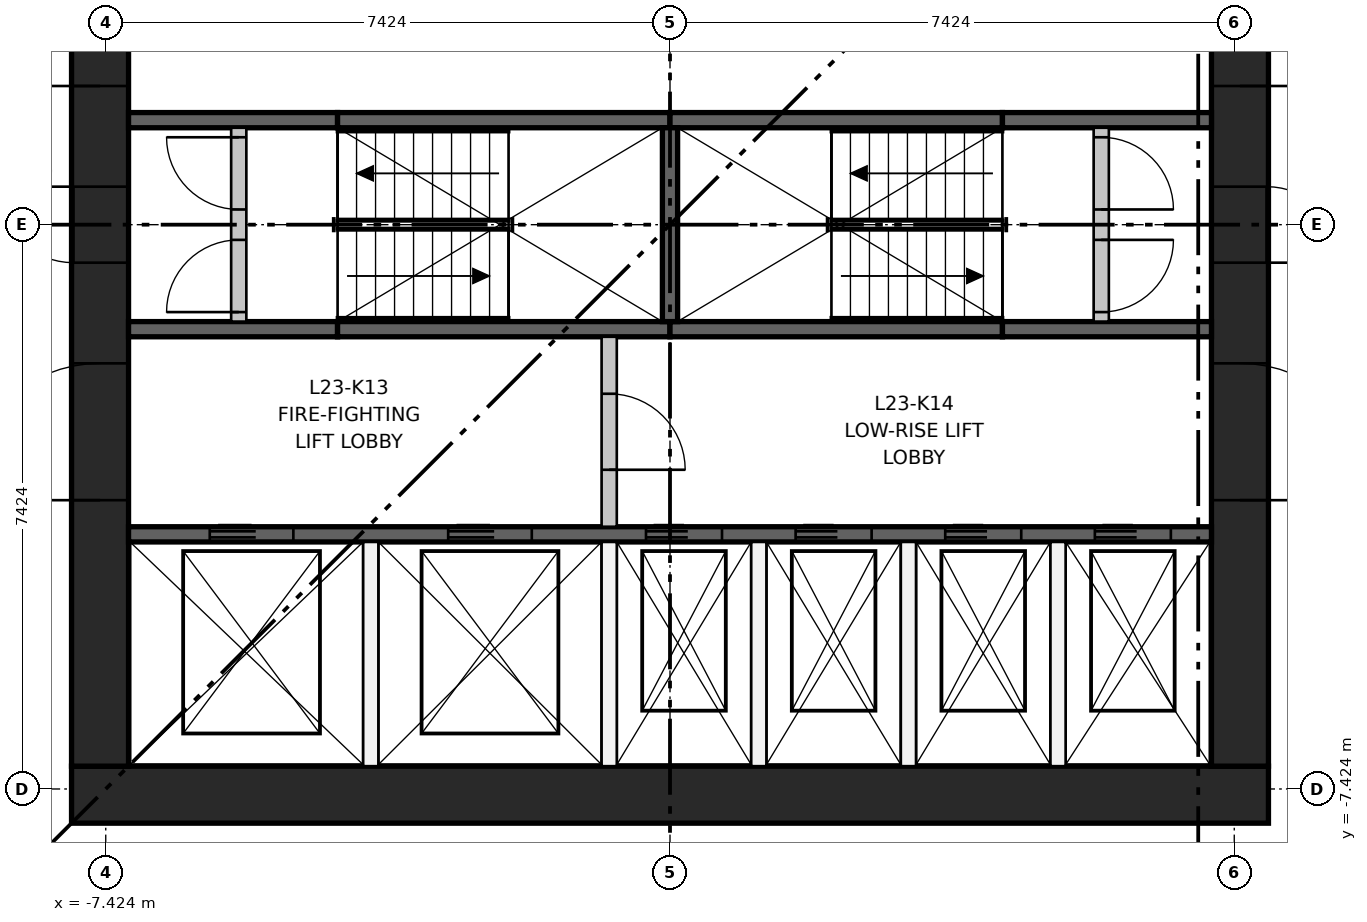
"""IFC4 building model, lengths in metres.
Left out: names, types, materials, properties, quantities, classifications, styles, units other than length and angle.
Written with IfcOpenShell. Run it as: python <this file> out.ifc"""

import sys

from ifc_helpers import new_model, si_unit, direction, frame, frame_2d, origin, place, context, subcontext, project, spatial, rectangle, extrude, element, fill, save


model = new_model("IFC4")
c1 = context("Model", 3, precision=1e-05, world=origin(), true_north=direction((0.0, 1.0)))
c2 = subcontext(c1, "Body", "Model", "MODEL_VIEW")
j1 = project(units=[si_unit("LENGTHUNIT", "METRE"), si_unit("PLANEANGLEUNIT", "RADIAN")], contexts=[c1])
p1 = place(None, origin())
s1 = spatial("IfcSite", under=j1, at=p1, CompositionType="ELEMENT")
p2 = place(p1, origin())
s2 = spatial("IfcBuilding", under=s1, at=p2, CompositionType="ELEMENT")
p3 = place(p2, frame((0.0, 0.0, 91.0)))
s3 = spatial("IfcBuildingStorey", under=s2, at=p3, CompositionType="ELEMENT", Elevation=91.0)
p4 = place(p3, frame((-7.874, -7.499, 0.0), z_axis=(0.0, 0.0, 1.0), x_axis=(1.0, 0.0, 0.0)))
e1 = element("IfcWall", 1, at=p4, inside=s3, PredefinedType="SHEAR", context=c2, shape_type="SweptSolid", body=[
    extrude(rectangle(XDim=15.748, YDim=0.75, at=frame_2d((7.874, 0.0))), origin(), (0.0, 0.0, 1.0), 3.65),
])
p5 = place(p3, frame((-7.499, -7.124, 0.0), z_axis=(0.0, 0.0, 1.0), x_axis=(0.0, 1.0, 0.0)))
e2 = element("IfcWall", 2, at=p5, inside=s3, PredefinedType="SHEAR", context=c2, shape_type="SweptSolid", body=[
    extrude(rectangle(XDim=14.248, YDim=0.75, at=frame_2d((7.124, 0.0))), origin(), (0.0, 0.0, 1.0), 3.65),
])
p6 = place(p5, frame((6.624, 0.0, 0.0)))
e3 = element("IfcOpeningElement", 3, at=p6, cuts=e2, PredefinedType="OPENING", context=c2, shape_type="SweptSolid", body=[
    extrude(rectangle(XDim=1.0, YDim=2.1, at=frame_2d((0.5, 1.05))), frame((0.0, 0.385, 0.0), z_axis=(0.0, -1.0, 0.0), x_axis=(1.0, 0.0, 0.0)), (0.0, 0.0, 1.0), 0.77),
])
p7 = place(p5, frame((3.5, 0.0, 0.0)))
e4 = element("IfcOpeningElement", 4, at=p7, cuts=e2, PredefinedType="OPENING", context=c2, shape_type="SweptSolid", body=[
    extrude(rectangle(XDim=1.8, YDim=2.1, at=frame_2d((0.9, 1.05))), frame((0.0, 0.385, 0.0), z_axis=(0.0, -1.0, 0.0), x_axis=(1.0, 0.0, 0.0)), (0.0, 0.0, 1.0), 0.77),
])
p8 = place(p5, frame((8.948, 0.0, 0.0)))
e5 = element("IfcOpeningElement", 5, at=p8, cuts=e2, PredefinedType="OPENING", context=c2, shape_type="SweptSolid", body=[
    extrude(rectangle(XDim=1.8, YDim=2.1, at=frame_2d((0.9, 1.05))), frame((0.0, 0.385, 0.0), z_axis=(0.0, -1.0, 0.0), x_axis=(1.0, 0.0, 0.0)), (0.0, 0.0, 1.0), 0.77),
])
p9 = place(p5, frame((12.124, 0.0, 0.0)))
e6 = element("IfcOpeningElement", 6, at=p9, cuts=e2, PredefinedType="OPENING", context=c2, shape_type="SweptSolid", body=[
    extrude(rectangle(XDim=1.0, YDim=2.1, at=frame_2d((0.5, 1.05))), frame((0.0, 0.385, 0.0), z_axis=(0.0, -1.0, 0.0), x_axis=(1.0, 0.0, 0.0)), (0.0, 0.0, 1.0), 0.77),
])
p10 = place(p3, frame((7.499, -7.124, 0.0), z_axis=(0.0, 0.0, 1.0), x_axis=(0.0, 1.0, 0.0)))
e7 = element("IfcWall", 7, at=p10, inside=s3, PredefinedType="SHEAR", context=c2, shape_type="SweptSolid", body=[
    extrude(rectangle(XDim=14.248, YDim=0.75, at=frame_2d((7.124, 0.0))), origin(), (0.0, 0.0, 1.0), 3.65),
])
p11 = place(p10, frame((6.624, 0.0, 0.0)))
e8 = element("IfcOpeningElement", 8, at=p11, cuts=e7, PredefinedType="OPENING", context=c2, shape_type="SweptSolid", body=[
    extrude(rectangle(XDim=1.0, YDim=2.1, at=frame_2d((0.5, 1.05))), frame((0.0, 0.385, 0.0), z_axis=(0.0, -1.0, 0.0), x_axis=(1.0, 0.0, 0.0)), (0.0, 0.0, 1.0), 0.77),
])
p12 = place(p10, frame((3.5, 0.0, 0.0)))
e9 = element("IfcOpeningElement", 9, at=p12, cuts=e7, PredefinedType="OPENING", context=c2, shape_type="SweptSolid", body=[
    extrude(rectangle(XDim=1.8, YDim=2.1, at=frame_2d((0.9, 1.05))), frame((0.0, 0.385, 0.0), z_axis=(0.0, -1.0, 0.0), x_axis=(1.0, 0.0, 0.0)), (0.0, 0.0, 1.0), 0.77),
])
p13 = place(p10, frame((8.948, 0.0, 0.0)))
e10 = element("IfcOpeningElement", 10, at=p13, cuts=e7, PredefinedType="OPENING", context=c2, shape_type="SweptSolid", body=[
    extrude(rectangle(XDim=1.8, YDim=2.1, at=frame_2d((0.9, 1.05))), frame((0.0, 0.385, 0.0), z_axis=(0.0, -1.0, 0.0), x_axis=(1.0, 0.0, 0.0)), (0.0, 0.0, 1.0), 0.77),
])
p14 = place(p3, frame((-7.124, -4.074, 0.0), z_axis=(0.0, 0.0, 1.0), x_axis=(1.0, 0.0, 0.0)))
e11 = element("IfcWall", 11, at=p14, inside=s3, PredefinedType="SHEAR", context=c2, shape_type="SweptSolid", body=[
    extrude(rectangle(XDim=14.248, YDim=0.2, at=frame_2d((7.124, 0.0))), origin(), (0.0, 0.0, 1.0), 3.3),
])
p15 = place(p14, frame((1.069, 0.0, 0.0)))
e12 = element("IfcOpeningElement", 12, at=p15, cuts=e11, PredefinedType="OPENING", context=c2, shape_type="SweptSolid", body=[
    extrude(rectangle(XDim=1.1, YDim=2.1, at=frame_2d((0.55, 1.05))), frame((0.0, 0.11, 0.0), z_axis=(0.0, -1.0, 0.0), x_axis=(1.0, 0.0, 0.0)), (0.0, 0.0, 1.0), 0.22),
])
p16 = place(p14, frame((4.206, 0.0, 0.0)))
e13 = element("IfcOpeningElement", 13, at=p16, cuts=e11, PredefinedType="OPENING", context=c2, shape_type="SweptSolid", body=[
    extrude(rectangle(XDim=1.1, YDim=2.1, at=frame_2d((0.55, 1.05))), frame((0.0, 0.11, 0.0), z_axis=(0.0, -1.0, 0.0), x_axis=(1.0, 0.0, 0.0)), (0.0, 0.0, 1.0), 0.22),
])
p17 = place(p14, frame((6.808, 0.0, 0.0)))
e14 = element("IfcOpeningElement", 14, at=p17, cuts=e11, PredefinedType="OPENING", context=c2, shape_type="SweptSolid", body=[
    extrude(rectangle(XDim=1.0, YDim=2.1, at=frame_2d((0.5, 1.05))), frame((0.0, 0.11, 0.0), z_axis=(0.0, -1.0, 0.0), x_axis=(1.0, 0.0, 0.0)), (0.0, 0.0, 1.0), 0.22),
])
p18 = place(p14, frame((8.777, 0.0, 0.0)))
e15 = element("IfcOpeningElement", 15, at=p18, cuts=e11, PredefinedType="OPENING", context=c2, shape_type="SweptSolid", body=[
    extrude(rectangle(XDim=1.0, YDim=2.1, at=frame_2d((0.5, 1.05))), frame((0.0, 0.11, 0.0), z_axis=(0.0, -1.0, 0.0), x_axis=(1.0, 0.0, 0.0)), (0.0, 0.0, 1.0), 0.22),
])
p19 = place(p14, frame((10.745, 0.0, 0.0)))
e16 = element("IfcOpeningElement", 16, at=p19, cuts=e11, PredefinedType="OPENING", context=c2, shape_type="SweptSolid", body=[
    extrude(rectangle(XDim=1.0, YDim=2.1, at=frame_2d((0.5, 1.05))), frame((0.0, 0.11, 0.0), z_axis=(0.0, -1.0, 0.0), x_axis=(1.0, 0.0, 0.0)), (0.0, 0.0, 1.0), 0.22),
])
p20 = place(p14, frame((12.714, 0.0, 0.0)))
e17 = element("IfcOpeningElement", 17, at=p20, cuts=e11, PredefinedType="OPENING", context=c2, shape_type="SweptSolid", body=[
    extrude(rectangle(XDim=1.0, YDim=2.1, at=frame_2d((0.5, 1.05))), frame((0.0, 0.11, 0.0), z_axis=(0.0, -1.0, 0.0), x_axis=(1.0, 0.0, 0.0)), (0.0, 0.0, 1.0), 0.22),
])
p21 = place(p3, frame((-7.124, -1.375, 0.0), z_axis=(0.0, 0.0, 1.0), x_axis=(1.0, 0.0, 0.0)))
e18 = element("IfcWall", 18, at=p21, inside=s3, PredefinedType="SHEAR", context=c2, shape_type="SweptSolid", body=[
    extrude(rectangle(XDim=2.75, YDim=0.2, at=frame_2d((1.375, 0.0))), origin(), (0.0, 0.0, 1.0), 3.3),
])
for number, where, z_axis, x_axis in (
    (19, (-4.374, -1.375, 0.0), (0.0, 0.0, 1.0), (1.0, 0.0, 0.0)),
    (20, (0.0, -1.375, 0.0), (0.0, 0.0, 1.0), (1.0, 0.0, 0.0)),
):
    element("IfcWall", number, at=place(p3, frame(where, z_axis=z_axis, x_axis=x_axis)), inside=s3, PredefinedType="SHEAR", context=c2, shape_type="SweptSolid", body=[
        extrude(rectangle(XDim=4.374, YDim=0.2, at=frame_2d((2.187, 0.0))), origin(), (0.0, 0.0, 1.0), 3.3),
    ])
for number, where, z_axis, x_axis in (
    (21, (4.374, -1.375, 0.0), (0.0, 0.0, 1.0), (1.0, 0.0, 0.0)),
    (22, (-7.124, 1.375, 0.0), (0.0, 0.0, 1.0), (1.0, 0.0, 0.0)),
):
    element("IfcWall", number, at=place(p3, frame(where, z_axis=z_axis, x_axis=x_axis)), inside=s3, PredefinedType="SHEAR", context=c2, shape_type="SweptSolid", body=[
        extrude(rectangle(XDim=2.75, YDim=0.2, at=frame_2d((1.375, 0.0))), origin(), (0.0, 0.0, 1.0), 3.3),
    ])
for number, where, z_axis, x_axis in (
    (23, (-4.374, 1.375, 0.0), (0.0, 0.0, 1.0), (1.0, 0.0, 0.0)),
    (24, (0.0, 1.375, 0.0), (0.0, 0.0, 1.0), (1.0, 0.0, 0.0)),
):
    element("IfcWall", number, at=place(p3, frame(where, z_axis=z_axis, x_axis=x_axis)), inside=s3, PredefinedType="SHEAR", context=c2, shape_type="SweptSolid", body=[
        extrude(rectangle(XDim=4.374, YDim=0.2, at=frame_2d((2.187, 0.0))), origin(), (0.0, 0.0, 1.0), 3.3),
    ])
p22 = place(p3, frame((4.374, 1.375, 0.0), z_axis=(0.0, 0.0, 1.0), x_axis=(1.0, 0.0, 0.0)))
e25 = element("IfcWall", 25, at=p22, inside=s3, PredefinedType="SHEAR", context=c2, shape_type="SweptSolid", body=[
    extrude(rectangle(XDim=2.75, YDim=0.2, at=frame_2d((1.375, 0.0))), origin(), (0.0, 0.0, 1.0), 3.3),
])
p23 = place(p3, frame((0.0, -1.275, 0.0), z_axis=(0.0, 0.0, 1.0), x_axis=(0.0, 1.0, 0.0)))
e26 = element("IfcWall", 26, at=p23, inside=s3, PredefinedType="SHEAR", context=c2, shape_type="SweptSolid", body=[
    extrude(rectangle(XDim=2.55, YDim=0.2, at=frame_2d((1.275, 0.0))), origin(), (0.0, 0.0, 1.0), 3.3),
])
for number, where, z_axis, x_axis in (
    (27, (-3.937, -7.124, 0.0), (0.0, 0.0, 1.0), (0.0, 1.0, 0.0)),
    (28, (-0.8, -7.124, 0.0), (0.0, 0.0, 1.0), (0.0, 1.0, 0.0)),
):
    element("IfcWall", number, at=place(p3, frame(where, z_axis=z_axis, x_axis=x_axis)), inside=s3, PredefinedType="PARTITIONING", context=c2, shape_type="SweptSolid", body=[
        extrude(rectangle(XDim=2.95, YDim=0.2, at=frame_2d((1.475, 0.0))), origin(), (0.0, 0.0, 1.0), 3.3),
    ])
p24 = place(p3, frame((-0.8, -3.974, 0.0), z_axis=(0.0, 0.0, 1.0), x_axis=(0.0, 1.0, 0.0)))
e29 = element("IfcWall", 29, at=p24, inside=s3, PredefinedType="PARTITIONING", context=c2, shape_type="SweptSolid", body=[
    extrude(rectangle(XDim=2.499, YDim=0.2, at=frame_2d((1.25, 0.0))), origin(), (0.0, 0.0, 1.0), 3.3),
])
p25 = place(p24, frame((0.75, 0.0, 0.0)))
e30 = element("IfcOpeningElement", 30, at=p25, cuts=e29, PredefinedType="OPENING", context=c2, shape_type="SweptSolid", body=[
    extrude(rectangle(XDim=1.0, YDim=2.1, at=frame_2d((0.5, 1.05))), frame((0.0, 0.11, 0.0), z_axis=(0.0, -1.0, 0.0), x_axis=(1.0, 0.0, 0.0)), (0.0, 0.0, 1.0), 0.22),
])
for number, where, z_axis, x_axis in (
    (31, (1.168, -7.124, 0.0), (0.0, 0.0, 1.0), (0.0, 1.0, 0.0)),
    (32, (3.137, -7.124, 0.0), (0.0, 0.0, 1.0), (0.0, 1.0, 0.0)),
    (33, (5.105, -7.124, 0.0), (0.0, 0.0, 1.0), (0.0, 1.0, 0.0)),
):
    element("IfcWall", number, at=place(p3, frame(where, z_axis=z_axis, x_axis=x_axis)), inside=s3, PredefinedType="PARTITIONING", context=c2, shape_type="SweptSolid", body=[
        extrude(rectangle(XDim=2.95, YDim=0.2, at=frame_2d((1.475, 0.0))), origin(), (0.0, 0.0, 1.0), 3.3),
    ])
p26 = place(p3, frame((-5.674, -1.275, 0.0), z_axis=(0.0, 0.0, 1.0), x_axis=(0.0, 1.0, 0.0)))
e34 = element("IfcWall", 34, at=p26, inside=s3, PredefinedType="PARTITIONING", context=c2, shape_type="SweptSolid", body=[
    extrude(rectangle(XDim=2.55, YDim=0.2, at=frame_2d((1.275, 0.0))), origin(), (0.0, 0.0, 1.0), 3.3),
])
p27 = place(p26, frame((0.125, 0.0, 0.0)))
e35 = element("IfcOpeningElement", 35, at=p27, cuts=e34, PredefinedType="OPENING", context=c2, shape_type="SweptSolid", body=[
    extrude(rectangle(XDim=0.95, YDim=2.1, at=frame_2d((0.475, 1.05))), frame((0.0, 0.11, 0.0), z_axis=(0.0, -1.0, 0.0), x_axis=(1.0, 0.0, 0.0)), (0.0, 0.0, 1.0), 0.22),
])
p28 = place(p26, frame((1.475, 0.0, 0.0)))
e36 = element("IfcOpeningElement", 36, at=p28, cuts=e34, PredefinedType="OPENING", context=c2, shape_type="SweptSolid", body=[
    extrude(rectangle(XDim=0.95, YDim=2.1, at=frame_2d((0.475, 1.05))), frame((0.0, 0.11, 0.0), z_axis=(0.0, -1.0, 0.0), x_axis=(1.0, 0.0, 0.0)), (0.0, 0.0, 1.0), 0.22),
])
p29 = place(p3, frame((5.674, -1.275, 0.0), z_axis=(0.0, 0.0, 1.0), x_axis=(0.0, 1.0, 0.0)))
e37 = element("IfcWall", 37, at=p29, inside=s3, PredefinedType="PARTITIONING", context=c2, shape_type="SweptSolid", body=[
    extrude(rectangle(XDim=2.55, YDim=0.2, at=frame_2d((1.275, 0.0))), origin(), (0.0, 0.0, 1.0), 3.3),
])
p30 = place(p29, frame((0.125, 0.0, 0.0)))
e38 = element("IfcOpeningElement", 38, at=p30, cuts=e37, PredefinedType="OPENING", context=c2, shape_type="SweptSolid", body=[
    extrude(rectangle(XDim=0.95, YDim=2.1, at=frame_2d((0.475, 1.05))), frame((0.0, 0.11, 0.0), z_axis=(0.0, -1.0, 0.0), x_axis=(1.0, 0.0, 0.0)), (0.0, 0.0, 1.0), 0.22),
])
p31 = place(p29, frame((1.475, 0.0, 0.0)))
e39 = element("IfcOpeningElement", 39, at=p31, cuts=e37, PredefinedType="OPENING", context=c2, shape_type="SweptSolid", body=[
    extrude(rectangle(XDim=0.95, YDim=2.1, at=frame_2d((0.475, 1.05))), frame((0.0, 0.11, 0.0), z_axis=(0.0, -1.0, 0.0), x_axis=(1.0, 0.0, 0.0)), (0.0, 0.0, 1.0), 0.22),
])
p32 = place(p15, origin())
e40 = element("IfcDoor", 40, at=p32, inside=s3, OperationType="DOUBLE_DOOR_SLIDING", PredefinedType="DOOR", context=c2, shape_type="SweptSolid", body=[
    extrude(rectangle(XDim=1.1, YDim=2.1, at=frame_2d((0.55, 1.05))), frame((0.0, 0.025, 0.0), z_axis=(0.0, -1.0, 0.0), x_axis=(1.0, 0.0, 0.0)), (0.0, 0.0, 1.0), 0.05),
])
fill(e12, e40)
p33 = place(p16, origin())
e41 = element("IfcDoor", 41, at=p33, inside=s3, OperationType="DOUBLE_DOOR_SLIDING", PredefinedType="DOOR", context=c2, shape_type="SweptSolid", body=[
    extrude(rectangle(XDim=1.1, YDim=2.1, at=frame_2d((0.55, 1.05))), frame((0.0, 0.025, 0.0), z_axis=(0.0, -1.0, 0.0), x_axis=(1.0, 0.0, 0.0)), (0.0, 0.0, 1.0), 0.05),
])
fill(e13, e41)
p34 = place(p17, origin())
e42 = element("IfcDoor", 42, at=p34, inside=s3, OperationType="DOUBLE_DOOR_SLIDING", PredefinedType="DOOR", context=c2, shape_type="SweptSolid", body=[
    extrude(rectangle(XDim=1.0, YDim=2.1, at=frame_2d((0.5, 1.05))), frame((0.0, 0.025, 0.0), z_axis=(0.0, -1.0, 0.0), x_axis=(1.0, 0.0, 0.0)), (0.0, 0.0, 1.0), 0.05),
])
fill(e14, e42)
p35 = place(p18, origin())
e43 = element("IfcDoor", 43, at=p35, inside=s3, OperationType="DOUBLE_DOOR_SLIDING", PredefinedType="DOOR", context=c2, shape_type="SweptSolid", body=[
    extrude(rectangle(XDim=1.0, YDim=2.1, at=frame_2d((0.5, 1.05))), frame((0.0, 0.025, 0.0), z_axis=(0.0, -1.0, 0.0), x_axis=(1.0, 0.0, 0.0)), (0.0, 0.0, 1.0), 0.05),
])
fill(e15, e43)
p36 = place(p19, origin())
e44 = element("IfcDoor", 44, at=p36, inside=s3, OperationType="DOUBLE_DOOR_SLIDING", PredefinedType="DOOR", context=c2, shape_type="SweptSolid", body=[
    extrude(rectangle(XDim=1.0, YDim=2.1, at=frame_2d((0.5, 1.05))), frame((0.0, 0.025, 0.0), z_axis=(0.0, -1.0, 0.0), x_axis=(1.0, 0.0, 0.0)), (0.0, 0.0, 1.0), 0.05),
])
fill(e16, e44)
p37 = place(p20, origin())
e45 = element("IfcDoor", 45, at=p37, inside=s3, OperationType="DOUBLE_DOOR_SLIDING", PredefinedType="DOOR", context=c2, shape_type="SweptSolid", body=[
    extrude(rectangle(XDim=1.0, YDim=2.1, at=frame_2d((0.5, 1.05))), frame((0.0, 0.025, 0.0), z_axis=(0.0, -1.0, 0.0), x_axis=(1.0, 0.0, 0.0)), (0.0, 0.0, 1.0), 0.05),
])
fill(e17, e45)
p38 = place(p27, origin())
e46 = element("IfcDoor", 46, at=p38, inside=s3, OperationType="SINGLE_SWING_LEFT", PredefinedType="DOOR", context=c2, shape_type="SweptSolid", body=[
    extrude(rectangle(XDim=0.95, YDim=2.1, at=frame_2d((0.475, 1.05))), frame((0.0, 0.025, 0.0), z_axis=(0.0, -1.0, 0.0), x_axis=(1.0, 0.0, 0.0)), (0.0, 0.0, 1.0), 0.05),
])
fill(e35, e46)
p39 = place(p28, origin())
e47 = element("IfcDoor", 47, at=p39, inside=s3, OperationType="SINGLE_SWING_RIGHT", PredefinedType="DOOR", context=c2, shape_type="SweptSolid", body=[
    extrude(rectangle(XDim=0.95, YDim=2.1, at=frame_2d((0.475, 1.05))), frame((0.0, 0.025, 0.0), z_axis=(0.0, -1.0, 0.0), x_axis=(1.0, 0.0, 0.0)), (0.0, 0.0, 1.0), 0.05),
])
fill(e36, e47)
p40 = place(p30, frame((0.95, 0.0, 0.0), z_axis=(0.0, 0.0, 1.0), x_axis=(-1.0, 0.0, 0.0)))
e48 = element("IfcDoor", 48, at=p40, inside=s3, OperationType="SINGLE_SWING_RIGHT", PredefinedType="DOOR", context=c2, shape_type="SweptSolid", body=[
    extrude(rectangle(XDim=0.95, YDim=2.1, at=frame_2d((0.475, 1.05))), frame((0.0, 0.025, 0.0), z_axis=(0.0, -1.0, 0.0), x_axis=(1.0, 0.0, 0.0)), (0.0, 0.0, 1.0), 0.05),
])
fill(e38, e48)
p41 = place(p31, frame((0.95, 0.0, 0.0), z_axis=(0.0, 0.0, 1.0), x_axis=(-1.0, 0.0, 0.0)))
e49 = element("IfcDoor", 49, at=p41, inside=s3, OperationType="SINGLE_SWING_LEFT", PredefinedType="DOOR", context=c2, shape_type="SweptSolid", body=[
    extrude(rectangle(XDim=0.95, YDim=2.1, at=frame_2d((0.475, 1.05))), frame((0.0, 0.025, 0.0), z_axis=(0.0, -1.0, 0.0), x_axis=(1.0, 0.0, 0.0)), (0.0, 0.0, 1.0), 0.05),
])
fill(e39, e49)
p42 = place(p25, frame((1.0, 0.0, 0.0), z_axis=(0.0, 0.0, 1.0), x_axis=(-1.0, 0.0, 0.0)))
e50 = element("IfcDoor", 50, at=p42, inside=s3, OperationType="SINGLE_SWING_LEFT", PredefinedType="DOOR", context=c2, shape_type="SweptSolid", body=[
    extrude(rectangle(XDim=1.0, YDim=2.1, at=frame_2d((0.5, 1.05))), frame((0.0, 0.025, 0.0), z_axis=(0.0, -1.0, 0.0), x_axis=(1.0, 0.0, 0.0)), (0.0, 0.0, 1.0), 0.05),
])
fill(e30, e50)
p43 = place(p6, origin())
e51 = element("IfcDoor", 51, at=p43, inside=s3, OperationType="SINGLE_SWING_RIGHT", PredefinedType="DOOR", context=c2, shape_type="SweptSolid", body=[
    extrude(rectangle(XDim=1.0, YDim=2.1, at=frame_2d((0.5, 1.05))), frame((0.0, 0.375, 0.0), z_axis=(0.0, -1.0, 0.0), x_axis=(1.0, 0.0, 0.0)), (0.0, 0.0, 1.0), 0.05),
])
fill(e3, e51)
p44 = place(p7, origin())
e52 = element("IfcDoor", 52, at=p44, inside=s3, OperationType="DOUBLE_DOOR_SINGLE_SWING", PredefinedType="DOOR", context=c2, shape_type="SweptSolid", body=[
    extrude(rectangle(XDim=1.8, YDim=2.1, at=frame_2d((0.9, 1.05))), frame((0.0, 0.025, 0.0), z_axis=(0.0, -1.0, 0.0), x_axis=(1.0, 0.0, 0.0)), (0.0, 0.0, 1.0), 0.05),
])
fill(e4, e52)
p45 = place(p8, origin())
e53 = element("IfcDoor", 53, at=p45, inside=s3, OperationType="DOUBLE_DOOR_SINGLE_SWING", PredefinedType="DOOR", context=c2, shape_type="SweptSolid", body=[
    extrude(rectangle(XDim=1.8, YDim=2.1, at=frame_2d((0.9, 1.05))), frame((0.0, 0.025, 0.0), z_axis=(0.0, -1.0, 0.0), x_axis=(1.0, 0.0, 0.0)), (0.0, 0.0, 1.0), 0.05),
])
fill(e5, e53)
p46 = place(p11, frame((1.0, 0.0, 0.0), z_axis=(0.0, 0.0, 1.0), x_axis=(-1.0, 0.0, 0.0)))
e54 = element("IfcDoor", 54, at=p46, inside=s3, OperationType="SINGLE_SWING_LEFT", PredefinedType="DOOR", context=c2, shape_type="SweptSolid", body=[
    extrude(rectangle(XDim=1.0, YDim=2.1, at=frame_2d((0.5, 1.05))), frame((0.0, 0.375, 0.0), z_axis=(0.0, -1.0, 0.0), x_axis=(1.0, 0.0, 0.0)), (0.0, 0.0, 1.0), 0.05),
])
fill(e8, e54)
p47 = place(p12, frame((1.8, 0.0, 0.0), z_axis=(0.0, 0.0, 1.0), x_axis=(-1.0, 0.0, 0.0)))
e55 = element("IfcDoor", 55, at=p47, inside=s3, OperationType="DOUBLE_DOOR_SINGLE_SWING", PredefinedType="DOOR", context=c2, shape_type="SweptSolid", body=[
    extrude(rectangle(XDim=1.8, YDim=2.1, at=frame_2d((0.9, 1.05))), frame((0.0, 0.025, 0.0), z_axis=(0.0, -1.0, 0.0), x_axis=(1.0, 0.0, 0.0)), (0.0, 0.0, 1.0), 0.05),
])
fill(e9, e55)
p48 = place(p13, frame((1.8, 0.0, 0.0), z_axis=(0.0, 0.0, 1.0), x_axis=(-1.0, 0.0, 0.0)))
e56 = element("IfcDoor", 56, at=p48, inside=s3, OperationType="DOUBLE_DOOR_SINGLE_SWING", PredefinedType="DOOR", context=c2, shape_type="SweptSolid", body=[
    extrude(rectangle(XDim=1.8, YDim=2.1, at=frame_2d((0.9, 1.05))), frame((0.0, 0.025, 0.0), z_axis=(0.0, -1.0, 0.0), x_axis=(1.0, 0.0, 0.0)), (0.0, 0.0, 1.0), 0.05),
])
fill(e10, e56)
save(model, sys.argv[1])
